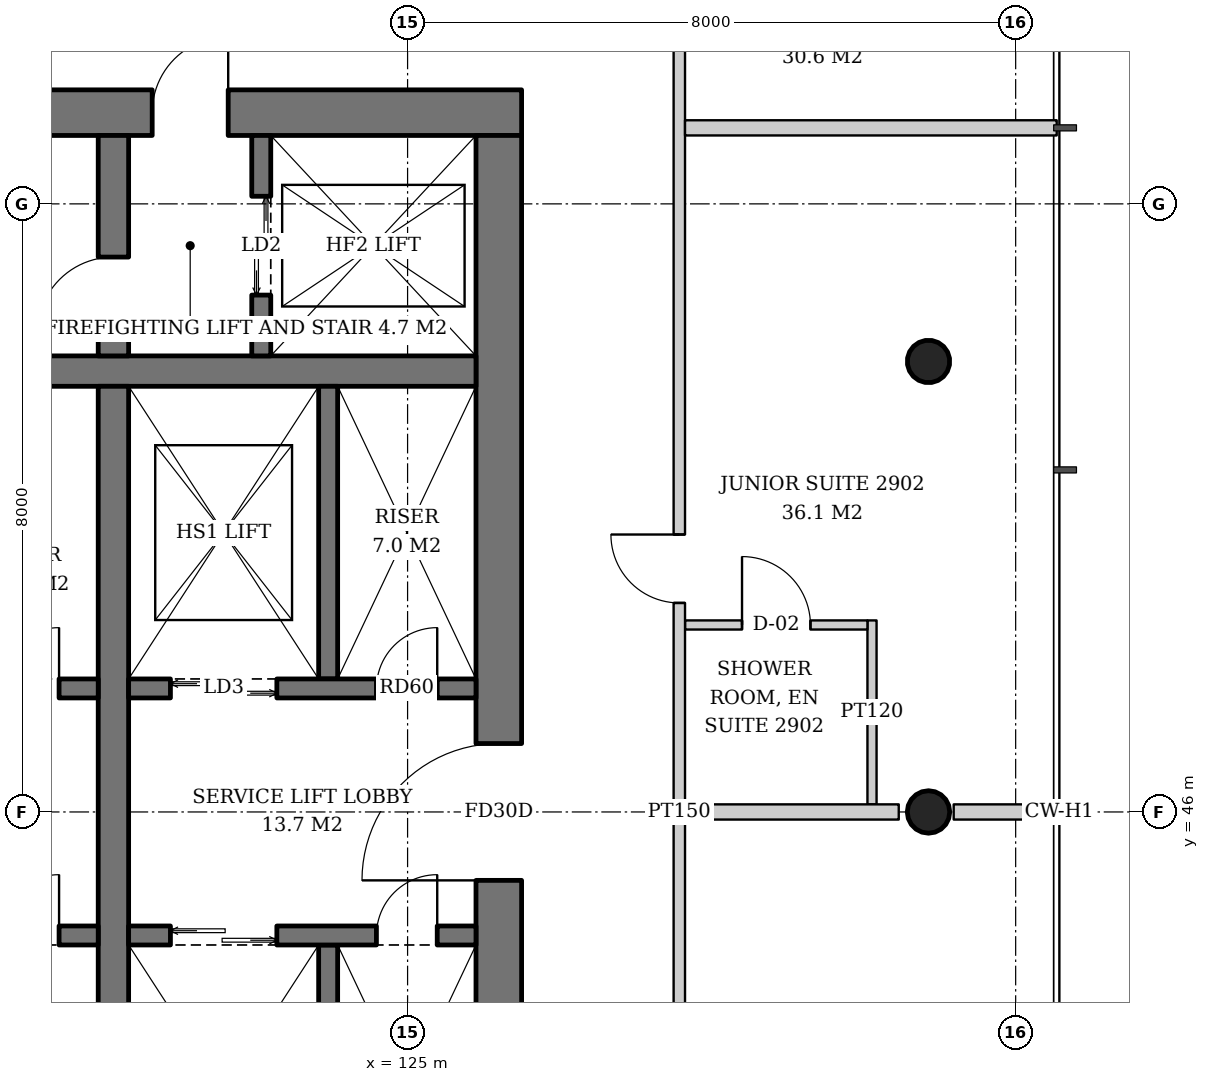
"""IFC4 building model, lengths in metres.
Left out: names, types, materials, properties, quantities, classifications, styles, units other than length and angle.
Written with IfcOpenShell. Run it as: python <this file> out.ifc"""

import sys

from ifc_helpers import new_model, si_unit, direction, frame, frame_2d, origin, origin_2d, place, context, subcontext, project, spatial, rectangle, hollow_circle, extrude, element, fill, save


model = new_model("IFC4")
c1 = context("Model", 3, precision=1e-05, world=origin(), true_north=direction((0.0, 1.0)))
c2 = subcontext(c1, "Body", "Model", "MODEL_VIEW")
j1 = project(units=[si_unit("LENGTHUNIT", "METRE"), si_unit("PLANEANGLEUNIT", "RADIAN")], contexts=[c1])
p1 = place(None, origin())
s1 = spatial("IfcSite", under=j1, at=p1, CompositionType="ELEMENT")
p2 = place(p1, origin())
s2 = spatial("IfcBuilding", under=s1, at=p2, CompositionType="ELEMENT")
p3 = place(p2, frame((0.0, 0.0, 116.0)))
s3 = spatial("IfcBuildingStorey", under=s2, at=p3, CompositionType="ELEMENT", Elevation=116.0)
p4 = place(p3, frame((131.905, 46.0, 0.0), z_axis=(-0.043069538298, 0.0, 0.999072076915), x_axis=(0.0, -1.0, 0.0)))
e1 = element("IfcColumn", 1, at=p4, inside=s3, PredefinedType="COLUMN", context=c2, shape_type="SweptSolid", body=[
    extrude(hollow_circle(Radius=0.28, WallThickness=0.02, at=origin_2d()), origin(), (0.0, 0.0, 1.0), 3.803),
])
p5 = place(p3, frame((131.905, 51.953, 0.0), z_axis=(-0.043059525333, -0.021561848751, 0.998839808957), x_axis=(0.44774654769, -0.894160516368, 0.0)))
e2 = element("IfcColumn", 2, at=p5, inside=s3, PredefinedType="COLUMN", context=c2, shape_type="SweptSolid", body=[
    extrude(hollow_circle(Radius=0.28, WallThickness=0.02, at=origin_2d()), origin(), (0.0, 0.0, 1.0), 3.804),
])
p6 = place(p3, frame((107.5, 55.2, 0.0), z_axis=(0.0, 0.0, 1.0), x_axis=(1.0, 0.0, 0.0)))
e3 = element("IfcWall", 3, at=p6, inside=s3, PredefinedType="SHEAR", context=c2, shape_type="SweptSolid", body=[
    extrude(rectangle(XDim=19.0, YDim=0.6, at=frame_2d((9.5, 0.0))), origin(), (0.0, 0.0, 1.0), 3.8),
])
p7 = place(p6, frame((14.14, 0.0, 0.0)))
e4 = element("IfcOpeningElement", 4, at=p7, cuts=e3, PredefinedType="OPENING", context=c2, shape_type="SweptSolid", body=[
    extrude(rectangle(XDim=1.0, YDim=2.1, at=frame_2d((0.5, 1.05))), frame((0.0, 0.31, 0.0), z_axis=(0.0, -1.0, 0.0), x_axis=(1.0, 0.0, 0.0)), (0.0, 0.0, 1.0), 0.62),
])
p8 = place(p6, frame((1.675, 0.0, 0.0)))
e5 = element("IfcOpeningElement", 5, at=p8, cuts=e3, PredefinedType="OPENING", context=c2, shape_type="SweptSolid", body=[
    extrude(rectangle(XDim=1.0, YDim=2.1, at=frame_2d((0.5, 1.05))), frame((0.0, 0.31, 0.0), z_axis=(0.0, -1.0, 0.0), x_axis=(1.0, 0.0, 0.0)), (0.0, 0.0, 1.0), 0.62),
])
p9 = place(p6, frame((3.587, 0.0, 0.0)))
e6 = element("IfcOpeningElement", 6, at=p9, cuts=e3, PredefinedType="OPENING", context=c2, shape_type="SweptSolid", body=[
    extrude(rectangle(XDim=1.0, YDim=2.1, at=frame_2d((0.5, 1.05))), frame((0.0, 0.31, 0.0), z_axis=(0.0, -1.0, 0.0), x_axis=(1.0, 0.0, 0.0)), (0.0, 0.0, 1.0), 0.62),
])
p10 = place(p3, frame((126.2, 37.1, 0.0), z_axis=(0.0, 0.0, 1.0), x_axis=(0.0, 1.0, 0.0)))
e7 = element("IfcWall", 7, at=p10, inside=s3, PredefinedType="SHEAR", context=c2, shape_type="SweptSolid", body=[
    extrude(rectangle(XDim=17.8, YDim=0.6, at=frame_2d((8.9, 0.0))), origin(), (0.0, 0.0, 1.0), 3.8),
])
p11 = place(p10, frame((8.0, 0.0, 0.0)))
e8 = element("IfcOpeningElement", 8, at=p11, cuts=e7, PredefinedType="OPENING", context=c2, shape_type="SweptSolid", body=[
    extrude(rectangle(XDim=1.8, YDim=2.4, at=frame_2d((0.9, 1.2))), frame((0.0, 0.31, 0.0), z_axis=(0.0, -1.0, 0.0), x_axis=(1.0, 0.0, 0.0)), (0.0, 0.0, 1.0), 0.62),
])
p12 = place(p3, frame((108.1, 51.8, 0.0), z_axis=(0.0, 0.0, 1.0), x_axis=(1.0, 0.0, 0.0)))
e9 = element("IfcWall", 9, at=p12, inside=s3, PredefinedType="SHEAR", context=c2, shape_type="SweptSolid", body=[
    extrude(rectangle(XDim=17.8, YDim=0.4, at=frame_2d((8.9, 0.0))), origin(), (0.0, 0.0, 1.0), 3.8),
])
p13 = place(p3, frame((121.13, 40.4, 0.0), z_axis=(0.0, 0.0, 1.0), x_axis=(0.0, 1.0, 0.0)))
e10 = element("IfcWall", 10, at=p13, inside=s3, PredefinedType="SHEAR", context=c2, shape_type="SweptSolid", body=[
    extrude(rectangle(XDim=11.2, YDim=0.4, at=frame_2d((5.6, 0.0))), origin(), (0.0, 0.0, 1.0), 3.8),
])
p14 = place(p3, frame((121.13, 52.0, 0.0), z_axis=(0.0, 0.0, 1.0), x_axis=(0.0, 1.0, 0.0)))
e11 = element("IfcWall", 11, at=p14, inside=s3, PredefinedType="SHEAR", context=c2, shape_type="SweptSolid", body=[
    extrude(rectangle(XDim=2.9, YDim=0.4, at=frame_2d((1.45, 0.0))), origin(), (0.0, 0.0, 1.0), 3.8),
])
p15 = place(p14, frame((0.3, 0.0, 0.0)))
e12 = element("IfcOpeningElement", 12, at=p15, cuts=e11, PredefinedType="OPENING", context=c2, shape_type="SweptSolid", body=[
    extrude(rectangle(XDim=1.0, YDim=2.1, at=frame_2d((0.5, 1.05))), frame((0.0, 0.21, 0.0), z_axis=(0.0, -1.0, 0.0), x_axis=(1.0, 0.0, 0.0)), (0.0, 0.0, 1.0), 0.42),
])
p16 = place(p3, frame((123.075, 52.0, 0.0), z_axis=(0.0, 0.0, 1.0), x_axis=(0.0, 1.0, 0.0)))
e13 = element("IfcWall", 13, at=p16, inside=s3, PredefinedType="SHEAR", context=c2, shape_type="SweptSolid", body=[
    extrude(rectangle(XDim=2.9, YDim=0.25, at=frame_2d((1.45, 0.0))), origin(), (0.0, 0.0, 1.0), 3.8),
])
p17 = place(p16, frame((0.8, 0.0, 0.0)))
e14 = element("IfcOpeningElement", 14, at=p17, cuts=e13, PredefinedType="OPENING", context=c2, shape_type="SweptSolid", body=[
    extrude(rectangle(XDim=1.3, YDim=2.2, at=frame_2d((0.65, 1.1))), frame((0.0, 0.135, 0.0), z_axis=(0.0, -1.0, 0.0), x_axis=(1.0, 0.0, 0.0)), (0.0, 0.0, 1.0), 0.27),
])
p18 = place(p3, frame((108.1, 47.625, 0.0), z_axis=(0.0, 0.0, 1.0), x_axis=(1.0, 0.0, 0.0)))
e15 = element("IfcWall", 15, at=p18, inside=s3, PredefinedType="SHEAR", context=c2, shape_type="SweptSolid", body=[
    extrude(rectangle(XDim=12.83, YDim=0.25, at=frame_2d((6.415, 0.0))), origin(), (0.0, 0.0, 1.0), 3.8),
])
p19 = place(p18, frame((0.7, 0.0, 0.0)))
e16 = element("IfcOpeningElement", 16, at=p19, cuts=e15, PredefinedType="OPENING", context=c2, shape_type="SweptSolid", body=[
    extrude(rectangle(XDim=1.1, YDim=2.2, at=frame_2d((0.55, 1.1))), frame((0.0, 0.135, 0.0), z_axis=(0.0, -1.0, 0.0), x_axis=(1.0, 0.0, 0.0)), (0.0, 0.0, 1.0), 0.27),
])
p20 = place(p18, frame((3.45, 0.0, 0.0)))
e17 = element("IfcOpeningElement", 17, at=p20, cuts=e15, PredefinedType="OPENING", context=c2, shape_type="SweptSolid", body=[
    extrude(rectangle(XDim=1.1, YDim=2.2, at=frame_2d((0.55, 1.1))), frame((0.0, 0.135, 0.0), z_axis=(0.0, -1.0, 0.0), x_axis=(1.0, 0.0, 0.0)), (0.0, 0.0, 1.0), 0.27),
])
p21 = place(p18, frame((6.2, 0.0, 0.0)))
e18 = element("IfcOpeningElement", 18, at=p21, cuts=e15, PredefinedType="OPENING", context=c2, shape_type="SweptSolid", body=[
    extrude(rectangle(XDim=1.1, YDim=2.2, at=frame_2d((0.55, 1.1))), frame((0.0, 0.135, 0.0), z_axis=(0.0, -1.0, 0.0), x_axis=(1.0, 0.0, 0.0)), (0.0, 0.0, 1.0), 0.27),
])
p22 = place(p18, frame((8.95, 0.0, 0.0)))
e19 = element("IfcOpeningElement", 19, at=p22, cuts=e15, PredefinedType="OPENING", context=c2, shape_type="SweptSolid", body=[
    extrude(rectangle(XDim=1.1, YDim=2.2, at=frame_2d((0.55, 1.1))), frame((0.0, 0.135, 0.0), z_axis=(0.0, -1.0, 0.0), x_axis=(1.0, 0.0, 0.0)), (0.0, 0.0, 1.0), 0.27),
])
p23 = place(p18, frame((11.515, 0.0, 0.0)))
e20 = element("IfcOpeningElement", 20, at=p23, cuts=e15, PredefinedType="OPENING", context=c2, shape_type="SweptSolid", body=[
    extrude(rectangle(XDim=0.8, YDim=2.0, at=frame_2d((0.4, 1.0))), frame((0.0, 0.135, 0.0), z_axis=(0.0, -1.0, 0.0), x_axis=(1.0, 0.0, 0.0)), (0.0, 0.0, 1.0), 0.27),
])
p24 = place(p3, frame((108.1, 44.375, 0.0), z_axis=(0.0, 0.0, 1.0), x_axis=(1.0, 0.0, 0.0)))
e21 = element("IfcWall", 21, at=p24, inside=s3, PredefinedType="SHEAR", context=c2, shape_type="SweptSolid", body=[
    extrude(rectangle(XDim=12.83, YDim=0.25, at=frame_2d((6.415, 0.0))), origin(), (0.0, 0.0, 1.0), 3.8),
])
p25 = place(p24, frame((0.7, 0.0, 0.0)))
e22 = element("IfcOpeningElement", 22, at=p25, cuts=e21, PredefinedType="OPENING", context=c2, shape_type="SweptSolid", body=[
    extrude(rectangle(XDim=1.1, YDim=2.2, at=frame_2d((0.55, 1.1))), frame((0.0, 0.135, 0.0), z_axis=(0.0, -1.0, 0.0), x_axis=(1.0, 0.0, 0.0)), (0.0, 0.0, 1.0), 0.27),
])
p26 = place(p24, frame((3.45, 0.0, 0.0)))
e23 = element("IfcOpeningElement", 23, at=p26, cuts=e21, PredefinedType="OPENING", context=c2, shape_type="SweptSolid", body=[
    extrude(rectangle(XDim=1.1, YDim=2.2, at=frame_2d((0.55, 1.1))), frame((0.0, 0.135, 0.0), z_axis=(0.0, -1.0, 0.0), x_axis=(1.0, 0.0, 0.0)), (0.0, 0.0, 1.0), 0.27),
])
p27 = place(p24, frame((6.2, 0.0, 0.0)))
e24 = element("IfcOpeningElement", 24, at=p27, cuts=e21, PredefinedType="OPENING", context=c2, shape_type="SweptSolid", body=[
    extrude(rectangle(XDim=1.1, YDim=2.2, at=frame_2d((0.55, 1.1))), frame((0.0, 0.135, 0.0), z_axis=(0.0, -1.0, 0.0), x_axis=(1.0, 0.0, 0.0)), (0.0, 0.0, 1.0), 0.27),
])
p28 = place(p24, frame((9.0, 0.0, 0.0)))
e25 = element("IfcOpeningElement", 25, at=p28, cuts=e21, PredefinedType="OPENING", context=c2, shape_type="SweptSolid", body=[
    extrude(rectangle(XDim=1.0, YDim=2.1, at=frame_2d((0.5, 1.05))), frame((0.0, 0.135, 0.0), z_axis=(0.0, -1.0, 0.0), x_axis=(1.0, 0.0, 0.0)), (0.0, 0.0, 1.0), 0.27),
])
p29 = place(p24, frame((11.515, 0.0, 0.0)))
e26 = element("IfcOpeningElement", 26, at=p29, cuts=e21, PredefinedType="OPENING", context=c2, shape_type="SweptSolid", body=[
    extrude(rectangle(XDim=0.8, YDim=2.0, at=frame_2d((0.4, 1.0))), frame((0.0, 0.135, 0.0), z_axis=(0.0, -1.0, 0.0), x_axis=(1.0, 0.0, 0.0)), (0.0, 0.0, 1.0), 0.27),
])
p30 = place(p3, frame((123.955, 47.75, 0.0), z_axis=(0.0, 0.0, 1.0), x_axis=(0.0, 1.0, 0.0)))
e27 = element("IfcWall", 27, at=p30, inside=s3, PredefinedType="SHEAR", context=c2, shape_type="SweptSolid", body=[
    extrude(rectangle(XDim=3.85, YDim=0.25, at=frame_2d((1.925, 0.0))), origin(), (0.0, 0.0, 1.0), 3.8),
])
p31 = place(p3, frame((121.33, 47.625, 0.0), z_axis=(0.0, 0.0, 1.0), x_axis=(1.0, 0.0, 0.0)))
e28 = element("IfcWall", 28, at=p31, inside=s3, PredefinedType="SHEAR", context=c2, shape_type="SweptSolid", body=[
    extrude(rectangle(XDim=4.57, YDim=0.25, at=frame_2d((2.285, 0.0))), origin(), (0.0, 0.0, 1.0), 3.8),
])
p32 = place(p31, frame((0.55, 0.0, 0.0)))
e29 = element("IfcOpeningElement", 29, at=p32, cuts=e28, PredefinedType="OPENING", context=c2, shape_type="SweptSolid", body=[
    extrude(rectangle(XDim=1.4, YDim=2.4, at=frame_2d((0.7, 1.2))), frame((0.0, 0.135, 0.0), z_axis=(0.0, -1.0, 0.0), x_axis=(1.0, 0.0, 0.0)), (0.0, 0.0, 1.0), 0.27),
])
p33 = place(p31, frame((3.26, 0.0, 0.0)))
e30 = element("IfcOpeningElement", 30, at=p33, cuts=e28, PredefinedType="OPENING", context=c2, shape_type="SweptSolid", body=[
    extrude(rectangle(XDim=0.8, YDim=2.0, at=frame_2d((0.4, 1.0))), frame((0.0, 0.135, 0.0), z_axis=(0.0, -1.0, 0.0), x_axis=(1.0, 0.0, 0.0)), (0.0, 0.0, 1.0), 0.27),
])
p34 = place(p3, frame((123.955, 44.25, 0.0), z_axis=(0.0, 0.0, 1.0), x_axis=(0.0, -1.0, 0.0)))
e31 = element("IfcWall", 31, at=p34, inside=s3, PredefinedType="SHEAR", context=c2, shape_type="SweptSolid", body=[
    extrude(rectangle(XDim=3.85, YDim=0.25, at=frame_2d((1.925, 0.0))), origin(), (0.0, 0.0, 1.0), 3.8),
])
p35 = place(p3, frame((121.33, 44.375, 0.0), z_axis=(0.0, 0.0, 1.0), x_axis=(1.0, 0.0, 0.0)))
e32 = element("IfcWall", 32, at=p35, inside=s3, PredefinedType="SHEAR", context=c2, shape_type="SweptSolid", body=[
    extrude(rectangle(XDim=4.57, YDim=0.25, at=frame_2d((2.285, 0.0))), origin(), (0.0, 0.0, 1.0), 3.8),
])
p36 = place(p35, frame((0.55, 0.0, 0.0)))
e33 = element("IfcOpeningElement", 33, at=p36, cuts=e32, PredefinedType="OPENING", context=c2, shape_type="SweptSolid", body=[
    extrude(rectangle(XDim=1.4, YDim=2.4, at=frame_2d((0.7, 1.2))), frame((0.0, 0.135, 0.0), z_axis=(0.0, -1.0, 0.0), x_axis=(1.0, 0.0, 0.0)), (0.0, 0.0, 1.0), 0.27),
])
p37 = place(p35, frame((3.26, 0.0, 0.0)))
e34 = element("IfcOpeningElement", 34, at=p37, cuts=e32, PredefinedType="OPENING", context=c2, shape_type="SweptSolid", body=[
    extrude(rectangle(XDim=0.8, YDim=2.0, at=frame_2d((0.4, 1.0))), frame((0.0, 0.135, 0.0), z_axis=(0.0, -1.0, 0.0), x_axis=(1.0, 0.0, 0.0)), (0.0, 0.0, 1.0), 0.27),
])
p38 = place(p3, frame((131.11, 46.1, 0.0), z_axis=(0.0, 0.0, 1.0), x_axis=(0.0, 1.0, 0.0)))
e35 = element("IfcWall", 35, at=p38, inside=s3, PredefinedType="PARTITIONING", context=c2, shape_type="SweptSolid", body=[
    extrude(rectangle(XDim=2.42, YDim=0.12, at=frame_2d((1.21, 0.0))), origin(), (0.0, 0.0, 1.0), 3.6),
])
p39 = place(p3, frame((128.65, 48.46, 0.0), z_axis=(0.0, 0.0, 1.0), x_axis=(1.0, 0.0, 0.0)))
e36 = element("IfcWall", 36, at=p39, inside=s3, PredefinedType="PARTITIONING", context=c2, shape_type="SweptSolid", body=[
    extrude(rectangle(XDim=2.4, YDim=0.12, at=frame_2d((1.2, 0.0))), origin(), (0.0, 0.0, 1.0), 3.6),
])
p40 = place(p39, frame((0.75, 0.0, 0.0)))
e37 = element("IfcOpeningElement", 37, at=p40, cuts=e36, PredefinedType="OPENING", context=c2, shape_type="SweptSolid", body=[
    extrude(rectangle(XDim=0.9, YDim=2.1, at=frame_2d((0.45, 1.05))), frame((0.0, 0.07, 0.0), z_axis=(0.0, -1.0, 0.0), x_axis=(1.0, 0.0, 0.0)), (0.0, 0.0, 1.0), 0.14),
])
p41 = place(p3, frame((128.575, 35.207, 0.0), z_axis=(0.0, 0.0, 1.0), x_axis=(0.0, 1.0, 0.0)))
e38 = element("IfcWall", 38, at=p41, inside=s3, PredefinedType="PARTITIONING", context=c2, shape_type="SweptSolid", body=[
    extrude(rectangle(XDim=21.586, YDim=0.15, at=frame_2d((10.793, 0.0))), origin(), (0.0, 0.0, 1.0), 2.9),
])
p42 = place(p41, frame((0.2, 0.0, 0.0)))
e39 = element("IfcOpeningElement", 39, at=p42, cuts=e38, PredefinedType="OPENING", context=c2, shape_type="SweptSolid", body=[
    extrude(rectangle(XDim=0.9, YDim=2.1, at=frame_2d((0.45, 1.05))), frame((0.0, 0.085, 0.0), z_axis=(0.0, -1.0, 0.0), x_axis=(1.0, 0.0, 0.0)), (0.0, 0.0, 1.0), 0.17),
])
p43 = place(p41, frame((4.493, 0.0, 0.0)))
e40 = element("IfcOpeningElement", 40, at=p43, cuts=e38, PredefinedType="OPENING", context=c2, shape_type="SweptSolid", body=[
    extrude(rectangle(XDim=1.0, YDim=2.1, at=frame_2d((0.5, 1.05))), frame((0.0, 0.085, 0.0), z_axis=(0.0, -1.0, 0.0), x_axis=(1.0, 0.0, 0.0)), (0.0, 0.0, 1.0), 0.17),
])
p44 = place(p41, frame((13.543, 0.0, 0.0)))
e41 = element("IfcOpeningElement", 41, at=p44, cuts=e38, PredefinedType="OPENING", context=c2, shape_type="SweptSolid", body=[
    extrude(rectangle(XDim=0.9, YDim=2.1, at=frame_2d((0.45, 1.05))), frame((0.0, 0.085, 0.0), z_axis=(0.0, -1.0, 0.0), x_axis=(1.0, 0.0, 0.0)), (0.0, 0.0, 1.0), 0.17),
])
p45 = place(p3, frame((128.65, 46.0, 0.0), z_axis=(0.0, 0.0, 1.0), x_axis=(1.0, 0.0, 0.0)))
e42 = element("IfcWall", 42, at=p45, inside=s3, PredefinedType="PARTITIONING", context=c2, shape_type="SweptSolid", body=[
    extrude(rectangle(XDim=2.812, YDim=0.2, at=frame_2d((1.406, 0.0))), origin(), (0.0, 0.0, 1.0), 3.6),
])
p46 = place(p3, frame((132.185, 46.0, 0.0), z_axis=(0.0, 0.0, 1.0), x_axis=(1.0, 0.0, 0.0)))
e43 = element("IfcWall", 43, at=p46, inside=s3, PredefinedType="PARTITIONING", context=c2, shape_type="SweptSolid", body=[
    extrude(rectangle(XDim=1.355, YDim=0.2, at=frame_2d((0.678, 0.0))), origin(), (0.0, 0.0, 1.0), 3.6),
])
p47 = place(p3, frame((128.65, 55.0, 0.0), z_axis=(0.0, 0.0, 1.0), x_axis=(1.0, 0.0, 0.0)))
e44 = element("IfcWall", 44, at=p47, inside=s3, PredefinedType="PARTITIONING", context=c2, shape_type="SweptSolid", body=[
    extrude(rectangle(XDim=4.89, YDim=0.2, at=frame_2d((2.445, 0.0))), origin(), (0.0, 0.0, 1.0), 3.2),
])
p48 = place(p17, origin())
e45 = element("IfcDoor", 45, at=p48, inside=s3, OperationType="DOUBLE_DOOR_SLIDING", PredefinedType="DOOR", context=c2, shape_type="SweptSolid", body=[
    extrude(rectangle(XDim=1.3, YDim=2.2, at=frame_2d((0.65, 1.1))), frame((0.0, 0.025, 0.0), z_axis=(0.0, -1.0, 0.0), x_axis=(1.0, 0.0, 0.0)), (0.0, 0.0, 1.0), 0.05),
])
fill(e14, e45)
p49 = place(p23, origin())
e46 = element("IfcDoor", 46, at=p49, inside=s3, OperationType="SINGLE_SWING_RIGHT", PredefinedType="DOOR", context=c2, shape_type="SweptSolid", body=[
    extrude(rectangle(XDim=0.8, YDim=2.0, at=frame_2d((0.4, 1.0))), frame((0.0, 0.025, 0.0), z_axis=(0.0, -1.0, 0.0), x_axis=(1.0, 0.0, 0.0)), (0.0, 0.0, 1.0), 0.05),
])
fill(e20, e46)
p50 = place(p29, origin())
e47 = element("IfcDoor", 47, at=p50, inside=s3, OperationType="SINGLE_SWING_RIGHT", PredefinedType="DOOR", context=c2, shape_type="SweptSolid", body=[
    extrude(rectangle(XDim=0.8, YDim=2.0, at=frame_2d((0.4, 1.0))), frame((0.0, 0.025, 0.0), z_axis=(0.0, -1.0, 0.0), x_axis=(1.0, 0.0, 0.0)), (0.0, 0.0, 1.0), 0.05),
])
fill(e26, e47)
p51 = place(p32, origin())
e48 = element("IfcDoor", 48, at=p51, inside=s3, OperationType="DOUBLE_DOOR_SLIDING", PredefinedType="DOOR", context=c2, shape_type="SweptSolid", body=[
    extrude(rectangle(XDim=1.4, YDim=2.4, at=frame_2d((0.7, 1.2))), frame((0.0, 0.025, 0.0), z_axis=(0.0, -1.0, 0.0), x_axis=(1.0, 0.0, 0.0)), (0.0, 0.0, 1.0), 0.05),
])
fill(e29, e48)
p52 = place(p33, origin())
e49 = element("IfcDoor", 49, at=p52, inside=s3, OperationType="SINGLE_SWING_RIGHT", PredefinedType="DOOR", context=c2, shape_type="SweptSolid", body=[
    extrude(rectangle(XDim=0.8, YDim=2.0, at=frame_2d((0.4, 1.0))), frame((0.0, 0.025, 0.0), z_axis=(0.0, -1.0, 0.0), x_axis=(1.0, 0.0, 0.0)), (0.0, 0.0, 1.0), 0.05),
])
fill(e30, e49)
p53 = place(p36, origin())
e50 = element("IfcDoor", 50, at=p53, inside=s3, OperationType="DOUBLE_DOOR_SLIDING", PredefinedType="DOOR", context=c2, shape_type="SweptSolid", body=[
    extrude(rectangle(XDim=1.4, YDim=2.4, at=frame_2d((0.7, 1.2))), frame((0.0, 0.025, 0.0), z_axis=(0.0, -1.0, 0.0), x_axis=(1.0, 0.0, 0.0)), (0.0, 0.0, 1.0), 0.05),
])
fill(e33, e50)
p54 = place(p37, origin())
e51 = element("IfcDoor", 51, at=p54, inside=s3, OperationType="SINGLE_SWING_RIGHT", PredefinedType="DOOR", context=c2, shape_type="SweptSolid", body=[
    extrude(rectangle(XDim=0.8, YDim=2.0, at=frame_2d((0.4, 1.0))), frame((0.0, 0.025, 0.0), z_axis=(0.0, -1.0, 0.0), x_axis=(1.0, 0.0, 0.0)), (0.0, 0.0, 1.0), 0.05),
])
fill(e34, e51)
p55 = place(p15, origin())
e52 = element("IfcDoor", 52, at=p55, inside=s3, OperationType="SINGLE_SWING_LEFT", PredefinedType="DOOR", context=c2, shape_type="SweptSolid", body=[
    extrude(rectangle(XDim=1.0, YDim=2.1, at=frame_2d((0.5, 1.05))), frame((0.0, 0.025, 0.0), z_axis=(0.0, -1.0, 0.0), x_axis=(1.0, 0.0, 0.0)), (0.0, 0.0, 1.0), 0.05),
])
fill(e12, e52)
p56 = place(p7, origin())
e53 = element("IfcDoor", 53, at=p56, inside=s3, OperationType="SINGLE_SWING_RIGHT", PredefinedType="DOOR", context=c2, shape_type="SweptSolid", body=[
    extrude(rectangle(XDim=1.0, YDim=2.1, at=frame_2d((0.5, 1.05))), frame((0.0, 0.025, 0.0), z_axis=(0.0, -1.0, 0.0), x_axis=(1.0, 0.0, 0.0)), (0.0, 0.0, 1.0), 0.05),
])
fill(e4, e53)
p57 = place(p11, origin())
e54 = element("IfcDoor", 54, at=p57, inside=s3, OperationType="DOUBLE_DOOR_SINGLE_SWING", PredefinedType="DOOR", context=c2, shape_type="SweptSolid", body=[
    extrude(rectangle(XDim=1.8, YDim=2.4, at=frame_2d((0.9, 1.2))), frame((0.0, 0.025, 0.0), z_axis=(0.0, -1.0, 0.0), x_axis=(1.0, 0.0, 0.0)), (0.0, 0.0, 1.0), 0.05),
])
fill(e8, e54)
p58 = place(p40, origin())
e55 = element("IfcDoor", 55, at=p58, inside=s3, OperationType="SINGLE_SWING_LEFT", PredefinedType="DOOR", context=c2, shape_type="SweptSolid", body=[
    extrude(rectangle(XDim=0.9, YDim=2.1, at=frame_2d((0.45, 1.05))), frame((0.0, 0.025, 0.0), z_axis=(0.0, -1.0, 0.0), x_axis=(1.0, 0.0, 0.0)), (0.0, 0.0, 1.0), 0.05),
])
fill(e37, e55)
p59 = place(p44, origin())
e56 = element("IfcDoor", 56, at=p59, inside=s3, OperationType="SINGLE_SWING_RIGHT", PredefinedType="DOOR", context=c2, shape_type="SweptSolid", body=[
    extrude(rectangle(XDim=0.9, YDim=2.1, at=frame_2d((0.45, 1.05))), frame((0.0, 0.025, 0.0), z_axis=(0.0, -1.0, 0.0), x_axis=(1.0, 0.0, 0.0)), (0.0, 0.0, 1.0), 0.05),
])
fill(e41, e56)
save(model, sys.argv[1])
